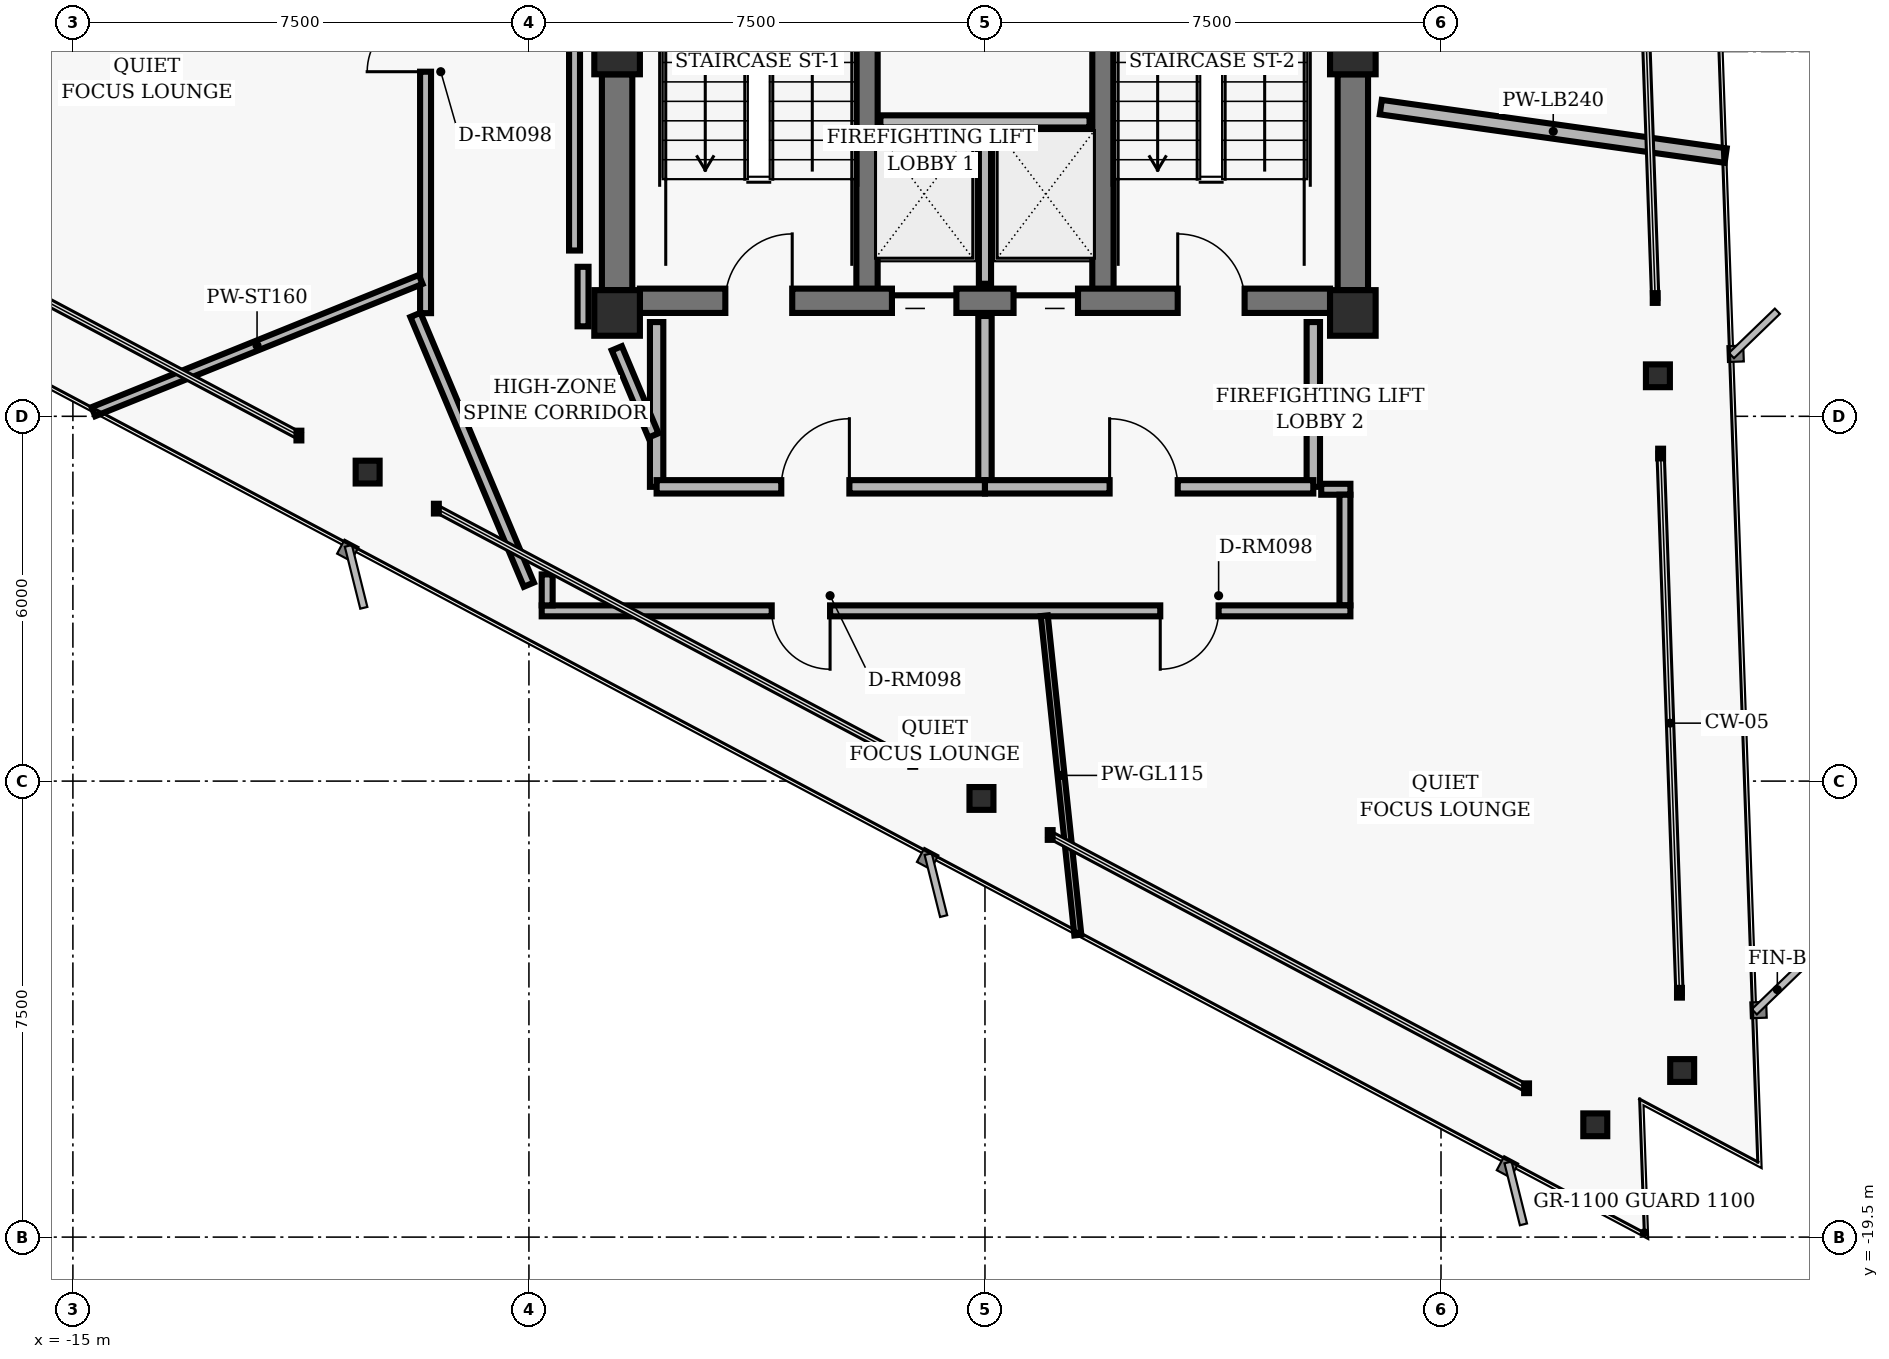
"""IFC4 building model, lengths in metres.
Left out: names, types, materials, properties, quantities, classifications, styles, units other than length and angle.
Written with IfcOpenShell. Run it as: python <this file> out.ifc"""

import sys

from ifc_helpers import new_model, si_unit, direction, frame, frame_2d, origin, origin_2d, place, context, subcontext, project, spatial, rectangle, hollow_rectangle, i_section, extrude, element, fill, save


model = new_model("IFC4")
c1 = context("Model", 3, precision=1e-05, world=origin(), true_north=direction((0.0, 1.0)))
c2 = subcontext(c1, "Body", "Model", "MODEL_VIEW")
j1 = project(units=[si_unit("LENGTHUNIT", "METRE"), si_unit("PLANEANGLEUNIT", "RADIAN")], contexts=[c1])
p1 = place(None, origin())
s1 = spatial("IfcSite", under=j1, at=p1, CompositionType="ELEMENT")
p2 = place(p1, origin())
s2 = spatial("IfcBuilding", under=s1, at=p2, CompositionType="ELEMENT")
p3 = place(p2, frame((0.0, 0.0, 205.76)))
s3 = spatial("IfcBuildingStorey", under=s2, at=p3, CompositionType="ELEMENT", Elevation=205.76)
for number, where, z_axis, x_axis in (
    (1, (-6.05, 0.0, 0.0), (0.0, 0.0, 1.0), (1.0, 0.0, 0.0)),
    (2, (6.05, 0.0, 0.0), (0.0, 0.0, 1.0), (1.0, 0.0, 0.0)),
    (3, (-6.05, -4.3, 0.0), (0.0, 0.0, 1.0), (1.0, 0.0, 0.0)),
    (4, (6.05, -4.3, 0.0), (0.0, 0.0, 1.0), (1.0, 0.0, 0.0)),
):
    element("IfcColumn", number, at=place(p3, frame(where, z_axis=z_axis, x_axis=x_axis)), inside=s3, PredefinedType="COLUMN", context=c2, shape_type="SweptSolid", body=[
        extrude(hollow_rectangle(XDim=0.75, YDim=0.75, WallThickness=0.05, InnerFilletRadius=0.02, OuterFilletRadius=0.04, at=origin_2d()), origin(), (0.0, 0.0, 1.0), 3.04),
    ])
for number, where, z_axis, x_axis in (
    (5, (-6.05, -3.925, 0.0), (0.0, 0.0, 1.0), (0.0, 1.0, 0.0)),
    (6, (6.05, -3.925, 0.0), (0.0, 0.0, 1.0), (0.0, 1.0, 0.0)),
):
    element("IfcWall", number, at=place(p3, frame(where, z_axis=z_axis, x_axis=x_axis)), inside=s3, PredefinedType="SHEAR", context=c2, shape_type="SweptSolid", body=[
        extrude(rectangle(XDim=3.55, YDim=0.5, at=frame_2d((1.775, 0.0))), origin(), (0.0, 0.0, 1.0), 2.798),
    ])
for number, where, z_axis, x_axis in (
    (7, (-1.94, -4.1, 0.0), (0.0, 0.0, 1.0), (0.0, 1.0, 0.0)),
    (8, (1.94, -4.1, 0.0), (0.0, 0.0, 1.0), (0.0, 1.0, 0.0)),
):
    element("IfcWall", number, at=place(p3, frame(where, z_axis=z_axis, x_axis=x_axis)), inside=s3, PredefinedType="SHEAR", context=c2, shape_type="SweptSolid", body=[
        extrude(rectangle(XDim=8.2, YDim=0.35, at=frame_2d((4.1, 0.0))), origin(), (0.0, 0.0, 1.0), 2.798),
    ])
p4 = place(p3, frame((-5.675, -4.1, 0.0), z_axis=(0.0, 0.0, 1.0), x_axis=(1.0, 0.0, 0.0)))
e9 = element("IfcWall", 9, at=p4, inside=s3, PredefinedType="SHEAR", context=c2, shape_type="SweptSolid", body=[
    extrude(rectangle(XDim=11.35, YDim=0.4, at=frame_2d((5.675, 0.0))), origin(), (0.0, 0.0, 1.0), 2.798),
])
p5 = place(p4, frame((1.405, 0.0, 0.0)))
e10 = element("IfcOpeningElement", 10, at=p5, cuts=e9, PredefinedType="OPENING", context=c2, shape_type="SweptSolid", body=[
    extrude(rectangle(XDim=1.1, YDim=2.04, at=frame_2d((0.55, 1.02))), frame((0.0, 0.21, 0.0), z_axis=(0.0, -1.0, 0.0), x_axis=(1.0, 0.0, 0.0)), (0.0, 0.0, 1.0), 0.42),
])
p6 = place(p4, frame((8.845, 0.0, 0.0)))
e11 = element("IfcOpeningElement", 11, at=p6, cuts=e9, PredefinedType="OPENING", context=c2, shape_type="SweptSolid", body=[
    extrude(rectangle(XDim=1.1, YDim=2.04, at=frame_2d((0.55, 1.02))), frame((0.0, 0.21, 0.0), z_axis=(0.0, -1.0, 0.0), x_axis=(1.0, 0.0, 0.0)), (0.0, 0.0, 1.0), 0.42),
])
p7 = place(p4, frame((4.145, 0.0, 0.0)))
e12 = element("IfcOpeningElement", 12, at=p7, cuts=e9, PredefinedType="OPENING", context=c2, shape_type="SweptSolid", body=[
    extrude(rectangle(XDim=1.06, YDim=2.04, at=frame_2d((0.53, 1.02))), frame((0.0, 0.21, 0.0), z_axis=(0.0, -1.0, 0.0), x_axis=(1.0, 0.0, 0.0)), (0.0, 0.0, 1.0), 0.42),
])
p8 = place(p4, frame((6.145, 0.0, 0.0)))
e13 = element("IfcOpeningElement", 13, at=p8, cuts=e9, PredefinedType="OPENING", context=c2, shape_type="SweptSolid", body=[
    extrude(rectangle(XDim=1.06, YDim=2.04, at=frame_2d((0.53, 1.02))), frame((0.0, 0.21, 0.0), z_axis=(0.0, -1.0, 0.0), x_axis=(1.0, 0.0, 0.0)), (0.0, 0.0, 1.0), 0.42),
])
for number, where, z_axis, x_axis in (
    (14, (11.466, -16.76, 0.0), (0.0, 0.0, 1.0), (1.0, 0.0, 0.0)),
    (15, (11.067, -5.334, 0.0), (0.0, 0.0, 1.0), (1.0, 0.0, 0.0)),
    (16, (-10.153, -6.918, 0.0), (0.0, 0.0, 1.0), (1.0, 0.0, 0.0)),
    (17, (-0.058, -12.285, 0.0), (0.0, 0.0, 1.0), (1.0, 0.0, 0.0)),
    (18, (10.037, -17.653, 0.0), (0.0, 0.0, 1.0), (1.0, 0.0, 0.0)),
):
    element("IfcColumn", number, at=place(p3, frame(where, z_axis=z_axis, x_axis=x_axis)), inside=s3, PredefinedType="COLUMN", context=c2, shape_type="SweptSolid", body=[
        extrude(i_section(OverallWidth=0.394, OverallDepth=0.375, WebThickness=0.017, FlangeThickness=0.028, FilletRadius=0.016, at=origin_2d()), origin(), (0.0, 0.0, 1.0), 3.04),
    ])
p9 = place(p3, frame((0.0, -3.82, 0.0), z_axis=(0.0, 0.0, 1.0), x_axis=(0.0, 1.0, 0.0)))
e19 = element("IfcWall", 19, at=p9, inside=s3, PredefinedType="PARTITIONING", context=c2, shape_type="SweptSolid", body=[
    extrude(rectangle(XDim=2.67, YDim=0.2, at=frame_2d((1.335, 0.0))), origin(), (0.0, 0.0, 1.0), 2.773),
])
p10 = place(p3, frame((-1.72, -1.15, 0.0), z_axis=(0.0, 0.0, 1.0), x_axis=(1.0, 0.0, 0.0)))
e20 = element("IfcWall", 20, at=p10, inside=s3, PredefinedType="PARTITIONING", context=c2, shape_type="SweptSolid", body=[
    extrude(rectangle(XDim=3.44, YDim=0.2, at=frame_2d((1.72, 0.0))), origin(), (0.0, 0.0, 1.0), 2.773),
])
for number, where, z_axis, x_axis in (
    (21, (-5.4, -7.16, 0.0), (0.0, 0.0, 1.0), (0.0, 1.0, 0.0)),
    (22, (5.4, -7.16, 0.0), (0.0, 0.0, 1.0), (0.0, 1.0, 0.0)),
):
    element("IfcWall", number, at=place(p3, frame(where, z_axis=z_axis, x_axis=x_axis)), inside=s3, PredefinedType="PARTITIONING", context=c2, shape_type="SweptSolid", body=[
        extrude(rectangle(XDim=2.71, YDim=0.22, at=frame_2d((1.355, 0.0))), origin(), (0.0, 0.0, 1.0), 2.773),
    ])
p11 = place(p3, frame((0.0, -7.16, 0.0), z_axis=(0.0, 0.0, 1.0), x_axis=(0.0, 1.0, 0.0)))
e23 = element("IfcWall", 23, at=p11, inside=s3, PredefinedType="PARTITIONING", context=c2, shape_type="SweptSolid", body=[
    extrude(rectangle(XDim=2.81, YDim=0.22, at=frame_2d((1.405, 0.0))), origin(), (0.0, 0.0, 1.0), 2.773),
])
p12 = place(p3, frame((-5.4, -7.16, 0.0), z_axis=(0.0, 0.0, 1.0), x_axis=(1.0, 0.0, 0.0)))
e24 = element("IfcWall", 24, at=p12, inside=s3, PredefinedType="PARTITIONING", context=c2, shape_type="SweptSolid", body=[
    extrude(rectangle(XDim=5.4, YDim=0.22, at=frame_2d((2.7, 0.0))), origin(), (0.0, 0.0, 1.0), 2.395),
])
p13 = place(p12, frame((2.05, 0.0, 0.0)))
e25 = element("IfcOpeningElement", 25, at=p13, cuts=e24, PredefinedType="OPENING", context=c2, shape_type="SweptSolid", body=[
    extrude(rectangle(XDim=1.12, YDim=2.02, at=frame_2d((0.56, 1.01))), frame((0.0, 0.12, 0.0), z_axis=(0.0, -1.0, 0.0), x_axis=(1.0, 0.0, 0.0)), (0.0, 0.0, 1.0), 0.24),
])
p14 = place(p3, frame((0.0, -7.16, 0.0), z_axis=(0.0, 0.0, 1.0), x_axis=(1.0, 0.0, 0.0)))
e26 = element("IfcWall", 26, at=p14, inside=s3, PredefinedType="PARTITIONING", context=c2, shape_type="SweptSolid", body=[
    extrude(rectangle(XDim=5.4, YDim=0.22, at=frame_2d((2.7, 0.0))), origin(), (0.0, 0.0, 1.0), 2.773),
])
p15 = place(p14, frame((2.05, 0.0, 0.0)))
e27 = element("IfcOpeningElement", 27, at=p15, cuts=e26, PredefinedType="OPENING", context=c2, shape_type="SweptSolid", body=[
    extrude(rectangle(XDim=1.12, YDim=2.02, at=frame_2d((0.56, 1.01))), frame((0.0, 0.12, 0.0), z_axis=(0.0, -1.0, 0.0), x_axis=(1.0, 0.0, 0.0)), (0.0, 0.0, 1.0), 0.24),
])
p16 = place(p3, frame((-7.501, -8.769, 0.0), z_axis=(0.0, 0.0, 1.0), x_axis=(-0.387573945081, 0.921838617706, 0.0)))
e28 = element("IfcWall", 28, at=p16, inside=s3, PredefinedType="PARTITIONING", context=c2, shape_type="SweptSolid", body=[
    extrude(rectangle(XDim=4.813, YDim=0.18, at=frame_2d((2.407, 0.0))), origin(), (0.0, 0.0, 1.0), 2.773),
])
p17 = place(p3, frame((-9.2, -4.303, 0.0), z_axis=(0.0, 0.0, 1.0), x_axis=(0.0, 1.0, 0.0)))
e29 = element("IfcWall", 29, at=p17, inside=s3, PredefinedType="PARTITIONING", context=c2, shape_type="SweptSolid", body=[
    extrude(rectangle(XDim=8.607, YDim=0.18, at=frame_2d((4.303, 0.0))), origin(), (0.0, 0.0, 1.0), 2.773),
])
p18 = place(p17, frame((3.971, 0.0, 0.0)))
e30 = element("IfcOpeningElement", 30, at=p18, cuts=e29, PredefinedType="OPENING", context=c2, shape_type="SweptSolid", body=[
    extrude(rectangle(XDim=0.96, YDim=2.02, at=frame_2d((0.48, 1.01))), frame((0.0, 0.1, 0.0), z_axis=(0.0, -1.0, 0.0), x_axis=(1.0, 0.0, 0.0)), (0.0, 0.0, 1.0), 0.2),
])
p19 = place(p3, frame((-6.75, 3.273, 0.0), z_axis=(0.0, 0.0, 1.0), x_axis=(0.0, -1.0, 0.0)))
e31 = element("IfcWall", 31, at=p19, inside=s3, PredefinedType="PARTITIONING", context=c2, shape_type="SweptSolid", body=[
    extrude(rectangle(XDim=6.547, YDim=0.18, at=frame_2d((3.273, 0.0))), origin(), (0.0, 0.0, 1.0), 2.773),
])
p20 = place(p3, frame((-6.61, -3.541, 0.0), z_axis=(0.0, 0.0, 1.0), x_axis=(0.0, -1.0, 0.0)))
e32 = element("IfcWall", 32, at=p20, inside=s3, PredefinedType="PARTITIONING", context=c2, shape_type="SweptSolid", body=[
    extrude(rectangle(XDim=0.979, YDim=0.18, at=frame_2d((0.489, 0.0))), origin(), (0.0, 0.0, 1.0), 2.773),
])
p21 = place(p3, frame((-6.055, -4.882, 0.0), z_axis=(0.0, 0.0, 1.0), x_axis=(0.387579540458, -0.921836265189, 0.0)))
e33 = element("IfcWall", 33, at=p21, inside=s3, PredefinedType="PARTITIONING", context=c2, shape_type="SweptSolid", body=[
    extrude(rectangle(XDim=1.555, YDim=0.18, at=frame_2d((0.777, 0.0))), origin(), (0.0, 0.0, 1.0), 2.253),
])
p22 = place(p3, frame((5.53, -7.2, 0.0), z_axis=(0.0, 0.0, 1.0), x_axis=(1.0, 0.0, 0.0)))
e34 = element("IfcWall", 34, at=p22, inside=s3, PredefinedType="PARTITIONING", context=c2, shape_type="SweptSolid", body=[
    extrude(rectangle(XDim=0.48, YDim=0.18, at=frame_2d((0.24, 0.0))), origin(), (0.0, 0.0, 1.0), 2.773),
])
p23 = place(p3, frame((5.92, -7.29, 0.0), z_axis=(0.0, 0.0, 1.0), x_axis=(0.0, -1.0, 0.0)))
e35 = element("IfcWall", 35, at=p23, inside=s3, PredefinedType="PARTITIONING", context=c2, shape_type="SweptSolid", body=[
    extrude(rectangle(XDim=1.82, YDim=0.18, at=frame_2d((0.91, 0.0))), origin(), (0.0, 0.0, 1.0), 2.773),
])
p24 = place(p3, frame((6.01, -9.2, 0.0), z_axis=(0.0, 0.0, 1.0), x_axis=(-1.0, 0.0, 0.0)))
e36 = element("IfcWall", 36, at=p24, inside=s3, PredefinedType="PARTITIONING", context=c2, shape_type="SweptSolid", body=[
    extrude(rectangle(XDim=13.3, YDim=0.18, at=frame_2d((6.65, 0.0))), origin(), (0.0, 0.0, 1.0), 2.395),
])
p25 = place(p24, frame((8.557, 0.0, 0.0)))
e37 = element("IfcOpeningElement", 37, at=p25, cuts=e36, PredefinedType="OPENING", context=c2, shape_type="SweptSolid", body=[
    extrude(rectangle(XDim=0.96, YDim=2.02, at=frame_2d((0.48, 1.01))), frame((0.0, 0.1, 0.0), z_axis=(0.0, -1.0, 0.0), x_axis=(1.0, 0.0, 0.0)), (0.0, 0.0, 1.0), 0.2),
])
p26 = place(p24, frame((2.167, 0.0, 0.0)))
e38 = element("IfcOpeningElement", 38, at=p26, cuts=e36, PredefinedType="OPENING", context=c2, shape_type="SweptSolid", body=[
    extrude(rectangle(XDim=0.96, YDim=2.02, at=frame_2d((0.48, 1.01))), frame((0.0, 0.1, 0.0), z_axis=(0.0, -1.0, 0.0), x_axis=(1.0, 0.0, 0.0)), (0.0, 0.0, 1.0), 0.2),
])
p27 = place(p3, frame((-7.2, -9.11, 0.0), z_axis=(0.0, 0.0, 1.0), x_axis=(0.0, 1.0, 0.0)))
e39 = element("IfcWall", 39, at=p27, inside=s3, PredefinedType="PARTITIONING", context=c2, shape_type="SweptSolid", body=[
    extrude(rectangle(XDim=0.51, YDim=0.18, at=frame_2d((0.255, 0.0))), origin(), (0.0, 0.0, 1.0), 2.773),
])
p28 = place(p3, frame((-9.28, -3.75, 0.0), z_axis=(0.0, 0.0, 1.0), x_axis=(-0.927192124848, -0.374586123102, 0.0)))
e40 = element("IfcWall", 40, at=p28, inside=s3, PredefinedType="PARTITIONING", context=c2, shape_type="SweptSolid", body=[
    extrude(rectangle(XDim=5.805, YDim=0.16, at=frame_2d((2.903, 0.0))), origin(), (0.0, 0.0, 1.0), 2.773),
])
p29 = place(p3, frame((0.975, -9.28, 0.0), z_axis=(0.0, 0.0, 1.0), x_axis=(0.104518746602, -0.994522916583, 0.0)))
e41 = element("IfcWall", 41, at=p29, inside=s3, PredefinedType="MOVABLE", context=c2, shape_type="SweptSolid", body=[
    extrude(rectangle(XDim=5.281, YDim=0.115, at=frame_2d((2.641, 0.0))), origin(), (0.0, 0.0, 1.0), 2.773),
])
p30 = place(p3, frame((6.51, -0.915, 0.0), z_axis=(0.0, 0.0, 1.0), x_axis=(0.990267505523, -0.139177108413, 0.0)))
e42 = element("IfcWall", 42, at=p30, inside=s3, PredefinedType="PARTITIONING", context=c2, shape_type="SweptSolid", body=[
    extrude(rectangle(XDim=5.727, YDim=0.24, at=frame_2d((2.864, 0.0))), origin(), (0.0, 0.0, 1.0), 2.773),
])
p31 = place(p5, origin())
e43 = element("IfcDoor", 43, at=p31, inside=s3, OperationType="SINGLE_SWING_RIGHT", PredefinedType="DOOR", context=c2, shape_type="SweptSolid", body=[
    extrude(rectangle(XDim=1.1, YDim=2.04, at=frame_2d((0.55, 1.02))), frame((0.0, 0.025, 0.0), z_axis=(0.0, -1.0, 0.0), x_axis=(1.0, 0.0, 0.0)), (0.0, 0.0, 1.0), 0.05),
])
fill(e10, e43)
p32 = place(p6, origin())
e44 = element("IfcDoor", 44, at=p32, inside=s3, OperationType="SINGLE_SWING_LEFT", PredefinedType="DOOR", context=c2, shape_type="SweptSolid", body=[
    extrude(rectangle(XDim=1.1, YDim=2.04, at=frame_2d((0.55, 1.02))), frame((0.0, 0.025, 0.0), z_axis=(0.0, -1.0, 0.0), x_axis=(1.0, 0.0, 0.0)), (0.0, 0.0, 1.0), 0.05),
])
fill(e11, e44)
p33 = place(p7, origin())
e45 = element("IfcDoor", 45, at=p33, inside=s3, OperationType="SLIDING_TO_LEFT", PredefinedType="DOOR", context=c2, shape_type="SweptSolid", body=[
    extrude(rectangle(XDim=1.06, YDim=2.04, at=frame_2d((0.53, 1.02))), frame((0.0, 0.025, 0.0), z_axis=(0.0, -1.0, 0.0), x_axis=(1.0, 0.0, 0.0)), (0.0, 0.0, 1.0), 0.05),
])
fill(e12, e45)
p34 = place(p8, origin())
e46 = element("IfcDoor", 46, at=p34, inside=s3, OperationType="SLIDING_TO_RIGHT", PredefinedType="DOOR", context=c2, shape_type="SweptSolid", body=[
    extrude(rectangle(XDim=1.06, YDim=2.04, at=frame_2d((0.53, 1.02))), frame((0.0, 0.025, 0.0), z_axis=(0.0, -1.0, 0.0), x_axis=(1.0, 0.0, 0.0)), (0.0, 0.0, 1.0), 0.05),
])
fill(e13, e46)
p35 = place(p13, origin())
e47 = element("IfcDoor", 47, at=p35, inside=s3, OperationType="SINGLE_SWING_RIGHT", PredefinedType="DOOR", context=c2, shape_type="SweptSolid", body=[
    extrude(rectangle(XDim=1.12, YDim=2.02, at=frame_2d((0.56, 1.01))), frame((0.0, 0.025, 0.0), z_axis=(0.0, -1.0, 0.0), x_axis=(1.0, 0.0, 0.0)), (0.0, 0.0, 1.0), 0.05),
])
fill(e25, e47)
p36 = place(p15, origin())
e48 = element("IfcDoor", 48, at=p36, inside=s3, OperationType="SINGLE_SWING_LEFT", PredefinedType="DOOR", context=c2, shape_type="SweptSolid", body=[
    extrude(rectangle(XDim=1.12, YDim=2.02, at=frame_2d((0.56, 1.01))), frame((0.0, 0.025, 0.0), z_axis=(0.0, -1.0, 0.0), x_axis=(1.0, 0.0, 0.0)), (0.0, 0.0, 1.0), 0.05),
])
fill(e27, e48)
p37 = place(p25, origin())
e49 = element("IfcDoor", 49, at=p37, inside=s3, OperationType="SINGLE_SWING_LEFT", PredefinedType="DOOR", context=c2, shape_type="SweptSolid", body=[
    extrude(rectangle(XDim=0.96, YDim=2.02, at=frame_2d((0.48, 1.01))), frame((0.0, 0.025, 0.0), z_axis=(0.0, -1.0, 0.0), x_axis=(1.0, 0.0, 0.0)), (0.0, 0.0, 1.0), 0.05),
])
fill(e37, e49)
p38 = place(p26, origin())
e50 = element("IfcDoor", 50, at=p38, inside=s3, OperationType="SINGLE_SWING_RIGHT", PredefinedType="DOOR", context=c2, shape_type="SweptSolid", body=[
    extrude(rectangle(XDim=0.96, YDim=2.02, at=frame_2d((0.48, 1.01))), frame((0.0, 0.025, 0.0), z_axis=(0.0, -1.0, 0.0), x_axis=(1.0, 0.0, 0.0)), (0.0, 0.0, 1.0), 0.05),
])
fill(e38, e50)
p39 = place(p18, origin())
e51 = element("IfcDoor", 51, at=p39, inside=s3, OperationType="SINGLE_SWING_LEFT", PredefinedType="DOOR", context=c2, shape_type="SweptSolid", body=[
    extrude(rectangle(XDim=0.96, YDim=2.02, at=frame_2d((0.48, 1.01))), frame((0.0, 0.025, 0.0), z_axis=(0.0, -1.0, 0.0), x_axis=(1.0, 0.0, 0.0)), (0.0, 0.0, 1.0), 0.05),
])
fill(e30, e51)
save(model, sys.argv[1])
